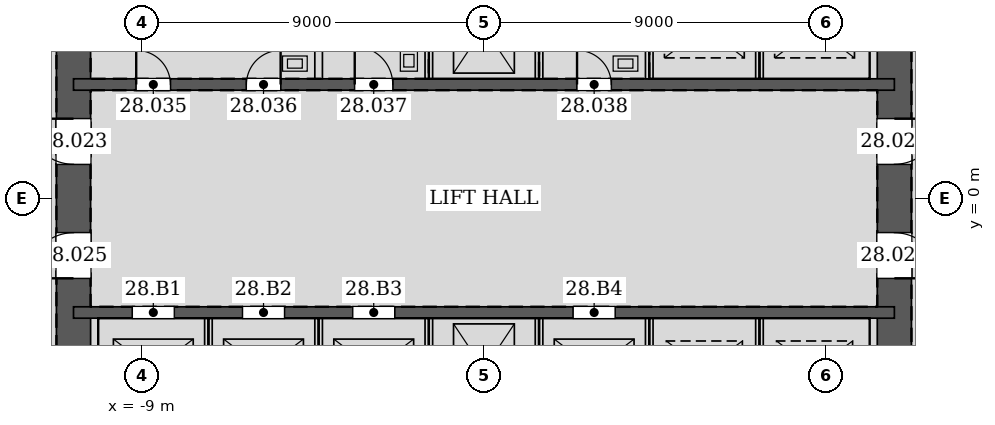
"""IFC4 building model, lengths in metres.
Left out: names, types, materials, properties, quantities, classifications, styles, units other than length and angle.
Written with IfcOpenShell. Run it as: python <this file> out.ifc"""

import sys

from ifc_helpers import new_model, si_unit, direction, frame, frame_2d, origin, place, context, subcontext, project, spatial, rectangle, extrude, element, fill, save


model = new_model("IFC4")
c1 = context("Model", 3, precision=1e-05, world=origin(), true_north=direction((0.0, 1.0)))
c2 = subcontext(c1, "Body", "Model", "MODEL_VIEW")
j1 = project(units=[si_unit("LENGTHUNIT", "METRE"), si_unit("PLANEANGLEUNIT", "RADIAN")], contexts=[c1])
p1 = place(None, origin())
s1 = spatial("IfcSite", under=j1, at=p1, CompositionType="ELEMENT")
p2 = place(p1, origin())
s2 = spatial("IfcBuilding", under=s1, at=p2, CompositionType="ELEMENT")
p3 = place(p2, frame((0.0, 0.0, 126.0)))
s3 = spatial("IfcBuildingStorey", under=s2, at=p3, CompositionType="ELEMENT", Elevation=126.0)
p4 = place(p3, frame((10.8, -10.8, 0.0), z_axis=(0.0, 0.0, 1.0), x_axis=(0.0, 1.0, 0.0)))
e1 = element("IfcWall", 1, at=p4, inside=s3, PredefinedType="SOLIDWALL", context=c2, shape_type="SweptSolid", body=[
    extrude(rectangle(XDim=21.6, YDim=0.9, at=frame_2d((10.8, 0.0))), origin(), (0.0, 0.0, 1.0), 4.2),
])
p5 = place(p4, frame((11.7, 0.0, 0.0)))
e2 = element("IfcOpeningElement", 2, at=p5, cuts=e1, PredefinedType="OPENING", context=c2, shape_type="SweptSolid", body=[
    extrude(rectangle(XDim=1.2, YDim=2.1, at=frame_2d((0.6, 1.05))), frame((0.0, 0.46, 0.0), z_axis=(0.0, -1.0, 0.0), x_axis=(1.0, 0.0, 0.0)), (0.0, 0.0, 1.0), 0.92),
])
p6 = place(p4, frame((8.7, 0.0, 0.0)))
e3 = element("IfcOpeningElement", 3, at=p6, cuts=e1, PredefinedType="OPENING", context=c2, shape_type="SweptSolid", body=[
    extrude(rectangle(XDim=1.2, YDim=2.1, at=frame_2d((0.6, 1.05))), frame((0.0, 0.46, 0.0), z_axis=(0.0, -1.0, 0.0), x_axis=(1.0, 0.0, 0.0)), (0.0, 0.0, 1.0), 0.92),
])
p7 = place(p3, frame((-10.8, 10.8, 0.0), z_axis=(0.0, 0.0, 1.0), x_axis=(0.0, -1.0, 0.0)))
e4 = element("IfcWall", 4, at=p7, inside=s3, PredefinedType="SOLIDWALL", context=c2, shape_type="SweptSolid", body=[
    extrude(rectangle(XDim=21.6, YDim=0.9, at=frame_2d((10.8, 0.0))), origin(), (0.0, 0.0, 1.0), 4.2),
])
p8 = place(p7, frame((8.7, 0.0, 0.0)))
e5 = element("IfcOpeningElement", 5, at=p8, cuts=e4, PredefinedType="OPENING", context=c2, shape_type="SweptSolid", body=[
    extrude(rectangle(XDim=1.2, YDim=2.1, at=frame_2d((0.6, 1.05))), frame((0.0, 0.46, 0.0), z_axis=(0.0, -1.0, 0.0), x_axis=(1.0, 0.0, 0.0)), (0.0, 0.0, 1.0), 0.92),
])
p9 = place(p7, frame((11.7, 0.0, 0.0)))
e6 = element("IfcOpeningElement", 6, at=p9, cuts=e4, PredefinedType="OPENING", context=c2, shape_type="SweptSolid", body=[
    extrude(rectangle(XDim=1.2, YDim=2.1, at=frame_2d((0.6, 1.05))), frame((0.0, 0.46, 0.0), z_axis=(0.0, -1.0, 0.0), x_axis=(1.0, 0.0, 0.0)), (0.0, 0.0, 1.0), 0.92),
])
p10 = place(p3, frame((-10.8, 3.0, 0.0), z_axis=(0.0, 0.0, 1.0), x_axis=(1.0, 0.0, 0.0)))
e7 = element("IfcWall", 7, at=p10, inside=s3, PredefinedType="SOLIDWALL", context=c2, shape_type="SweptSolid", body=[
    extrude(rectangle(XDim=21.6, YDim=0.3, at=frame_2d((10.8, 0.0))), origin(), (0.0, 0.0, 1.0), 4.2),
])
p11 = place(p10, frame((1.65, 0.0, 0.0)))
e8 = element("IfcOpeningElement", 8, at=p11, cuts=e7, PredefinedType="OPENING", context=c2, shape_type="SweptSolid", body=[
    extrude(rectangle(XDim=0.9, YDim=2.1, at=frame_2d((0.45, 1.05))), frame((0.0, 0.16, 0.0), z_axis=(0.0, -1.0, 0.0), x_axis=(1.0, 0.0, 0.0)), (0.0, 0.0, 1.0), 0.32),
])
p12 = place(p10, frame((4.55, 0.0, 0.0)))
e9 = element("IfcOpeningElement", 9, at=p12, cuts=e7, PredefinedType="OPENING", context=c2, shape_type="SweptSolid", body=[
    extrude(rectangle(XDim=0.9, YDim=2.1, at=frame_2d((0.45, 1.05))), frame((0.0, 0.16, 0.0), z_axis=(0.0, -1.0, 0.0), x_axis=(1.0, 0.0, 0.0)), (0.0, 0.0, 1.0), 0.32),
])
p13 = place(p10, frame((7.4, 0.0, 0.0)))
e10 = element("IfcOpeningElement", 10, at=p13, cuts=e7, PredefinedType="OPENING", context=c2, shape_type="SweptSolid", body=[
    extrude(rectangle(XDim=1.0, YDim=2.1, at=frame_2d((0.5, 1.05))), frame((0.0, 0.16, 0.0), z_axis=(0.0, -1.0, 0.0), x_axis=(1.0, 0.0, 0.0)), (0.0, 0.0, 1.0), 0.32),
])
p14 = place(p10, frame((13.25, 0.0, 0.0)))
e11 = element("IfcOpeningElement", 11, at=p14, cuts=e7, PredefinedType="OPENING", context=c2, shape_type="SweptSolid", body=[
    extrude(rectangle(XDim=0.9, YDim=2.1, at=frame_2d((0.45, 1.05))), frame((0.0, 0.16, 0.0), z_axis=(0.0, -1.0, 0.0), x_axis=(1.0, 0.0, 0.0)), (0.0, 0.0, 1.0), 0.32),
])
p15 = place(p3, frame((-10.8, -3.0, 0.0), z_axis=(0.0, 0.0, 1.0), x_axis=(1.0, 0.0, 0.0)))
e12 = element("IfcWall", 12, at=p15, inside=s3, PredefinedType="SOLIDWALL", context=c2, shape_type="SweptSolid", body=[
    extrude(rectangle(XDim=21.6, YDim=0.3, at=frame_2d((10.8, 0.0))), origin(), (0.0, 0.0, 1.0), 4.2),
])
p16 = place(p15, frame((1.55, 0.0, 0.0)))
e13 = element("IfcOpeningElement", 13, at=p16, cuts=e12, PredefinedType="OPENING", context=c2, shape_type="SweptSolid", body=[
    extrude(rectangle(XDim=1.1, YDim=2.1, at=frame_2d((0.55, 1.05))), frame((0.0, 0.16, 0.0), z_axis=(0.0, -1.0, 0.0), x_axis=(1.0, 0.0, 0.0)), (0.0, 0.0, 1.0), 0.32),
])
p17 = place(p15, frame((4.45, 0.0, 0.0)))
e14 = element("IfcOpeningElement", 14, at=p17, cuts=e12, PredefinedType="OPENING", context=c2, shape_type="SweptSolid", body=[
    extrude(rectangle(XDim=1.1, YDim=2.1, at=frame_2d((0.55, 1.05))), frame((0.0, 0.16, 0.0), z_axis=(0.0, -1.0, 0.0), x_axis=(1.0, 0.0, 0.0)), (0.0, 0.0, 1.0), 0.32),
])
p18 = place(p15, frame((7.35, 0.0, 0.0)))
e15 = element("IfcOpeningElement", 15, at=p18, cuts=e12, PredefinedType="OPENING", context=c2, shape_type="SweptSolid", body=[
    extrude(rectangle(XDim=1.1, YDim=2.1, at=frame_2d((0.55, 1.05))), frame((0.0, 0.16, 0.0), z_axis=(0.0, -1.0, 0.0), x_axis=(1.0, 0.0, 0.0)), (0.0, 0.0, 1.0), 0.32),
])
p19 = place(p15, frame((13.15, 0.0, 0.0)))
e16 = element("IfcOpeningElement", 16, at=p19, cuts=e12, PredefinedType="OPENING", context=c2, shape_type="SweptSolid", body=[
    extrude(rectangle(XDim=1.1, YDim=2.1, at=frame_2d((0.55, 1.05))), frame((0.0, 0.16, 0.0), z_axis=(0.0, -1.0, 0.0), x_axis=(1.0, 0.0, 0.0)), (0.0, 0.0, 1.0), 0.32),
])
for number, where, z_axis, x_axis in (
    (17, (-4.35, 3.15, 0.0), (0.0, 0.0, 1.0), (0.0, 1.0, 0.0)),
    (18, (-1.45, 3.15, 0.0), (0.0, 0.0, 1.0), (0.0, 1.0, 0.0)),
    (19, (1.45, 3.15, 0.0), (0.0, 0.0, 1.0), (0.0, 1.0, 0.0)),
    (20, (4.35, 3.15, 0.0), (0.0, 0.0, 1.0), (0.0, 1.0, 0.0)),
):
    element("IfcWall", number, at=place(p3, frame(where, z_axis=z_axis, x_axis=x_axis)), inside=s3, PredefinedType="PARTITIONING", context=c2, shape_type="SweptSolid", body=[
        extrude(rectangle(XDim=2.7, YDim=0.2, at=frame_2d((1.35, 0.0))), origin(), (0.0, 0.0, 1.0), 4.035),
    ])
for number, where, z_axis, x_axis in (
    (21, (7.25, 3.15, 0.0), (0.0, 0.0, 1.0), (0.0, 1.0, 0.0)),
    (22, (-7.25, -5.85, 0.0), (0.0, 0.0, 1.0), (0.0, 1.0, 0.0)),
    (23, (-4.35, -5.85, 0.0), (0.0, 0.0, 1.0), (0.0, 1.0, 0.0)),
    (24, (-1.45, -5.85, 0.0), (0.0, 0.0, 1.0), (0.0, 1.0, 0.0)),
    (25, (1.45, -5.85, 0.0), (0.0, 0.0, 1.0), (0.0, 1.0, 0.0)),
    (26, (4.35, -5.85, 0.0), (0.0, 0.0, 1.0), (0.0, 1.0, 0.0)),
    (27, (7.25, -5.85, 0.0), (0.0, 0.0, 1.0), (0.0, 1.0, 0.0)),
):
    element("IfcWall", number, at=place(p3, frame(where, z_axis=z_axis, x_axis=x_axis)), inside=s3, PredefinedType="PARTITIONING", context=c2, shape_type="SweptSolid", body=[
        extrude(rectangle(XDim=2.7, YDim=0.2, at=frame_2d((1.35, 0.0))), origin(), (0.0, 0.0, 1.0), 4.2),
    ])
p20 = place(p5, frame((1.2, 0.0, 0.0), z_axis=(0.0, 0.0, 1.0), x_axis=(-1.0, 0.0, 0.0)))
e28 = element("IfcDoor", 28, at=p20, inside=s3, OperationType="SINGLE_SWING_LEFT", PredefinedType="DOOR", context=c2, shape_type="SweptSolid", body=[
    extrude(rectangle(XDim=1.2, YDim=2.1, at=frame_2d((0.6, 1.05))), frame((0.0, 0.025, 0.0), z_axis=(0.0, -1.0, 0.0), x_axis=(1.0, 0.0, 0.0)), (0.0, 0.0, 1.0), 0.05),
])
fill(e2, e28)
p21 = place(p8, frame((1.2, 0.0, 0.0), z_axis=(0.0, 0.0, 1.0), x_axis=(-1.0, 0.0, 0.0)))
e29 = element("IfcDoor", 29, at=p21, inside=s3, OperationType="SINGLE_SWING_RIGHT", PredefinedType="DOOR", context=c2, shape_type="SweptSolid", body=[
    extrude(rectangle(XDim=1.2, YDim=2.1, at=frame_2d((0.6, 1.05))), frame((0.0, 0.025, 0.0), z_axis=(0.0, -1.0, 0.0), x_axis=(1.0, 0.0, 0.0)), (0.0, 0.0, 1.0), 0.05),
])
fill(e5, e29)
p22 = place(p6, frame((1.2, 0.0, 0.0), z_axis=(0.0, 0.0, 1.0), x_axis=(-1.0, 0.0, 0.0)))
e30 = element("IfcDoor", 30, at=p22, inside=s3, OperationType="SINGLE_SWING_RIGHT", PredefinedType="DOOR", context=c2, shape_type="SweptSolid", body=[
    extrude(rectangle(XDim=1.2, YDim=2.1, at=frame_2d((0.6, 1.05))), frame((0.0, 0.025, 0.0), z_axis=(0.0, -1.0, 0.0), x_axis=(1.0, 0.0, 0.0)), (0.0, 0.0, 1.0), 0.05),
])
fill(e3, e30)
p23 = place(p9, frame((1.2, 0.0, 0.0), z_axis=(0.0, 0.0, 1.0), x_axis=(-1.0, 0.0, 0.0)))
e31 = element("IfcDoor", 31, at=p23, inside=s3, OperationType="SINGLE_SWING_LEFT", PredefinedType="DOOR", context=c2, shape_type="SweptSolid", body=[
    extrude(rectangle(XDim=1.2, YDim=2.1, at=frame_2d((0.6, 1.05))), frame((0.0, 0.025, 0.0), z_axis=(0.0, -1.0, 0.0), x_axis=(1.0, 0.0, 0.0)), (0.0, 0.0, 1.0), 0.05),
])
fill(e6, e31)
p24 = place(p11, origin())
e32 = element("IfcDoor", 32, at=p24, inside=s3, OperationType="SINGLE_SWING_LEFT", PredefinedType="DOOR", context=c2, shape_type="SweptSolid", body=[
    extrude(rectangle(XDim=0.9, YDim=2.1, at=frame_2d((0.45, 1.05))), frame((0.0, 0.025, 0.0), z_axis=(0.0, -1.0, 0.0), x_axis=(1.0, 0.0, 0.0)), (0.0, 0.0, 1.0), 0.05),
])
fill(e8, e32)
p25 = place(p12, origin())
e33 = element("IfcDoor", 33, at=p25, inside=s3, OperationType="SINGLE_SWING_RIGHT", PredefinedType="DOOR", context=c2, shape_type="SweptSolid", body=[
    extrude(rectangle(XDim=0.9, YDim=2.1, at=frame_2d((0.45, 1.05))), frame((0.0, 0.025, 0.0), z_axis=(0.0, -1.0, 0.0), x_axis=(1.0, 0.0, 0.0)), (0.0, 0.0, 1.0), 0.05),
])
fill(e9, e33)
p26 = place(p13, origin())
e34 = element("IfcDoor", 34, at=p26, inside=s3, OperationType="SINGLE_SWING_LEFT", PredefinedType="DOOR", context=c2, shape_type="SweptSolid", body=[
    extrude(rectangle(XDim=1.0, YDim=2.1, at=frame_2d((0.5, 1.05))), frame((0.0, 0.025, 0.0), z_axis=(0.0, -1.0, 0.0), x_axis=(1.0, 0.0, 0.0)), (0.0, 0.0, 1.0), 0.05),
])
fill(e10, e34)
p27 = place(p14, origin())
e35 = element("IfcDoor", 35, at=p27, inside=s3, OperationType="SINGLE_SWING_LEFT", PredefinedType="DOOR", context=c2, shape_type="SweptSolid", body=[
    extrude(rectangle(XDim=0.9, YDim=2.1, at=frame_2d((0.45, 1.05))), frame((0.0, 0.025, 0.0), z_axis=(0.0, -1.0, 0.0), x_axis=(1.0, 0.0, 0.0)), (0.0, 0.0, 1.0), 0.05),
])
fill(e11, e35)
p28 = place(p16, origin())
e36 = element("IfcDoor", 36, at=p28, inside=s3, OperationType="DOUBLE_DOOR_SLIDING", PredefinedType="DOOR", context=c2, shape_type="SweptSolid", body=[
    extrude(rectangle(XDim=1.1, YDim=2.1, at=frame_2d((0.55, 1.05))), frame((0.0, 0.025, 0.0), z_axis=(0.0, -1.0, 0.0), x_axis=(1.0, 0.0, 0.0)), (0.0, 0.0, 1.0), 0.05),
])
fill(e13, e36)
p29 = place(p17, origin())
e37 = element("IfcDoor", 37, at=p29, inside=s3, OperationType="DOUBLE_DOOR_SLIDING", PredefinedType="DOOR", context=c2, shape_type="SweptSolid", body=[
    extrude(rectangle(XDim=1.1, YDim=2.1, at=frame_2d((0.55, 1.05))), frame((0.0, 0.025, 0.0), z_axis=(0.0, -1.0, 0.0), x_axis=(1.0, 0.0, 0.0)), (0.0, 0.0, 1.0), 0.05),
])
fill(e14, e37)
p30 = place(p18, origin())
e38 = element("IfcDoor", 38, at=p30, inside=s3, OperationType="DOUBLE_DOOR_SLIDING", PredefinedType="DOOR", context=c2, shape_type="SweptSolid", body=[
    extrude(rectangle(XDim=1.1, YDim=2.1, at=frame_2d((0.55, 1.05))), frame((0.0, 0.025, 0.0), z_axis=(0.0, -1.0, 0.0), x_axis=(1.0, 0.0, 0.0)), (0.0, 0.0, 1.0), 0.05),
])
fill(e15, e38)
p31 = place(p19, origin())
e39 = element("IfcDoor", 39, at=p31, inside=s3, OperationType="DOUBLE_DOOR_SLIDING", PredefinedType="DOOR", context=c2, shape_type="SweptSolid", body=[
    extrude(rectangle(XDim=1.1, YDim=2.1, at=frame_2d((0.55, 1.05))), frame((0.0, 0.025, 0.0), z_axis=(0.0, -1.0, 0.0), x_axis=(1.0, 0.0, 0.0)), (0.0, 0.0, 1.0), 0.05),
])
fill(e16, e39)
save(model, sys.argv[1])
